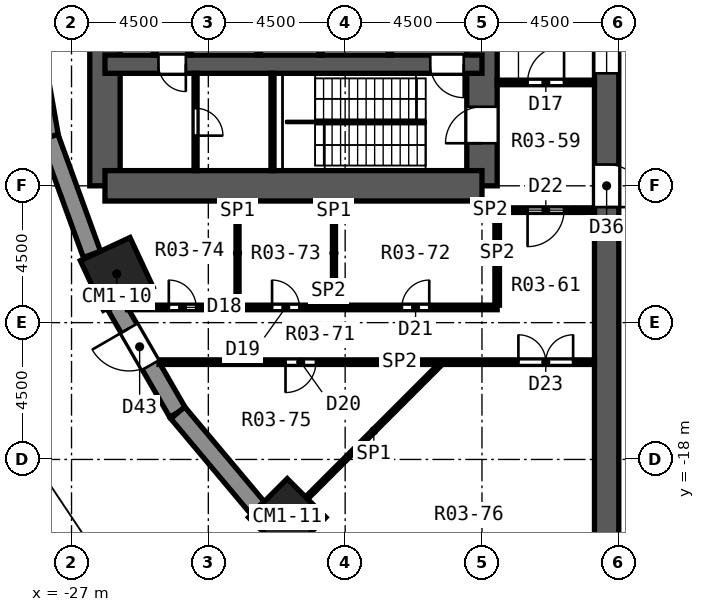
"""IFC4 building model, lengths in metres.
Left out: names, types, materials, properties, quantities, classifications, styles, units other than length and angle.
Written with IfcOpenShell. Run it as: python <this file> out.ifc"""

import sys

from ifc_helpers import new_model, si_unit, direction, frame, frame_2d, origin, origin_2d, place, context, subcontext, project, spatial, rectangle, extrude, element, fill, save


model = new_model("IFC4")
c1 = context("Model", 3, precision=1e-05, world=origin(), true_north=direction((0.0, 1.0)))
c2 = subcontext(c1, "Body", "Model", "MODEL_VIEW")
j1 = project(units=[si_unit("LENGTHUNIT", "METRE"), si_unit("PLANEANGLEUNIT", "RADIAN")], contexts=[c1])
p1 = place(None, origin())
s1 = spatial("IfcSite", under=j1, at=p1, CompositionType="ELEMENT")
p2 = place(p1, origin())
s2 = spatial("IfcBuilding", under=s1, at=p2, CompositionType="ELEMENT")
p3 = place(p2, origin())
s3 = spatial("IfcBuildingStorey", under=s2, at=p3, CompositionType="ELEMENT", Elevation=0.0)
for number, where, z_axis, x_axis in (
    (1, (-25.512, -11.897, 0.0), (0.0, 0.0, 1.0), (-0.906, -0.423, 0.0)),
    (2, (-19.905, -19.905, 0.0), (0.0, 0.0, 1.0), (-0.707, -0.707, 0.0)),
):
    element("IfcColumn", number, at=place(p3, frame(where, z_axis=z_axis, x_axis=x_axis)), inside=s3, PredefinedType="COLUMN", context=c2, shape_type="SweptSolid", body=[
        extrude(rectangle(XDim=1.8, YDim=1.8, at=origin_2d()), origin(), (0.0, 0.0, 1.0), 5.0),
    ])
p4 = place(p3, frame((-13.5, -9.0, 0.0), z_axis=(0.0, 0.0, 1.0), x_axis=(0.0, 1.0, 0.0)))
e3 = element("IfcWall", 3, at=p4, inside=s3, PredefinedType="SHEAR", context=c2, shape_type="SweptSolid", body=[
    extrude(rectangle(XDim=18.0, YDim=1.0, at=frame_2d((9.0, 0.0))), origin(), (0.0, 0.0, 1.0), 5.0),
])
p5 = place(p4, frame((15.4, 0.0, 0.0)))
e4 = element("IfcOpeningElement", 4, at=p5, cuts=e3, PredefinedType="OPENING", context=c2, shape_type="SweptSolid", body=[
    extrude(rectangle(XDim=1.2, YDim=2.1, at=frame_2d((0.6, 1.05))), frame((0.0, 0.512, 0.0), z_axis=(0.0, -1.0, 0.0), x_axis=(1.0, 0.0, 0.0)), (0.0, 0.0, 1.0), 1.024),
])
p6 = place(p4, frame((1.4, 0.0, 0.0)))
e5 = element("IfcOpeningElement", 5, at=p6, cuts=e3, PredefinedType="OPENING", context=c2, shape_type="SweptSolid", body=[
    extrude(rectangle(XDim=1.2, YDim=2.1, at=frame_2d((0.6, 1.05))), frame((0.0, 0.512, 0.0), z_axis=(0.0, -1.0, 0.0), x_axis=(1.0, 0.0, 0.0)), (0.0, 0.0, 1.0), 1.024),
])
p7 = place(p4, frame((7.5, 0.0, 0.0)))
e6 = element("IfcOpeningElement", 6, at=p7, cuts=e3, PredefinedType="OPENING", context=c2, shape_type="SweptSolid", body=[
    extrude(rectangle(XDim=3.0, YDim=2.4, at=frame_2d((1.5, 1.2))), frame((0.0, 0.512, 0.0), z_axis=(0.0, -1.0, 0.0), x_axis=(1.0, 0.0, 0.0)), (0.0, 0.0, 1.0), 1.024),
])
p8 = place(p3, frame((-25.9, -9.0, 0.0), z_axis=(0.0, 0.0, 1.0), x_axis=(0.0, 1.0, 0.0)))
e7 = element("IfcWall", 7, at=p8, inside=s3, PredefinedType="SHEAR", context=c2, shape_type="SweptSolid", body=[
    extrude(rectangle(XDim=18.0, YDim=1.0, at=frame_2d((9.0, 0.0))), origin(), (0.0, 0.0, 1.0), 5.0),
])
p9 = place(p3, frame((-13.5, -9.0, 0.0), z_axis=(0.0, 0.0, 1.0), x_axis=(-1.0, 0.0, 0.0)))
e8 = element("IfcWall", 8, at=p9, inside=s3, PredefinedType="SHEAR", context=c2, shape_type="SweptSolid", body=[
    extrude(rectangle(XDim=12.4, YDim=1.0, at=frame_2d((6.2, 0.0))), origin(), (0.0, 0.0, 1.0), 5.0),
])
p10 = place(p3, frame((-13.5, -5.0, 0.0), z_axis=(0.0, 0.0, 1.0), x_axis=(-1.0, 0.0, 0.0)))
e9 = element("IfcWall", 9, at=p10, inside=s3, PredefinedType="SHEAR", context=c2, shape_type="SweptSolid", body=[
    extrude(rectangle(XDim=12.4, YDim=0.6, at=frame_2d((6.2, 0.0))), origin(), (0.0, 0.0, 1.0), 5.0),
])
p11 = place(p10, frame((9.74, 0.0, 0.0)))
e10 = element("IfcOpeningElement", 10, at=p11, cuts=e9, PredefinedType="OPENING", context=c2, shape_type="SweptSolid", body=[
    extrude(rectangle(XDim=0.9, YDim=2.1, at=frame_2d((0.45, 1.05))), frame((0.0, 0.312, 0.0), z_axis=(0.0, -1.0, 0.0), x_axis=(1.0, 0.0, 0.0)), (0.0, 0.0, 1.0), 0.624),
])
p12 = place(p10, frame((0.6, 0.0, 0.0)))
e11 = element("IfcOpeningElement", 11, at=p12, cuts=e9, PredefinedType="OPENING", context=c2, shape_type="SweptSolid", body=[
    extrude(rectangle(XDim=1.1, YDim=2.1, at=frame_2d((0.55, 1.05))), frame((0.0, 0.312, 0.0), z_axis=(0.0, -1.0, 0.0), x_axis=(1.0, 0.0, 0.0)), (0.0, 0.0, 1.0), 0.624),
])
p13 = place(p3, frame((-9.4, -27.077, 0.0), z_axis=(0.0, 0.0, 1.0), x_axis=(0.0, 1.0, 0.0)))
e12 = element("IfcWall", 12, at=p13, inside=s3, PredefinedType="SHEAR", context=c2, shape_type="SweptSolid", body=[
    extrude(rectangle(XDim=54.154, YDim=0.8, at=frame_2d((27.077, 0.0))), origin(), (0.0, 0.0, 1.0), 5.0),
])
p14 = place(p13, frame((17.377, 0.0, 0.0)))
e13 = element("IfcOpeningElement", 13, at=p14, cuts=e12, PredefinedType="OPENING", context=c2, shape_type="SweptSolid", body=[
    extrude(rectangle(XDim=1.4, YDim=2.1, at=frame_2d((0.7, 1.05))), frame((0.0, 0.412, 0.0), z_axis=(0.0, -1.0, 0.0), x_axis=(1.0, 0.0, 0.0)), (0.0, 0.0, 1.0), 0.824),
])
p15 = place(p13, frame((21.777, 0.0, 0.3)))
e14 = element("IfcOpeningElement", 14, at=p15, cuts=e12, PredefinedType="OPENING", context=c2, shape_type="SweptSolid", body=[
    extrude(rectangle(XDim=2.4, YDim=2.1, at=frame_2d((1.2, 1.05))), frame((0.0, 0.412, 0.0), z_axis=(0.0, -1.0, 0.0), x_axis=(1.0, 0.0, 0.0)), (0.0, 0.0, 1.0), 0.824),
])
p16 = place(p13, frame((24.377, 0.0, 0.0)))
e15 = element("IfcOpeningElement", 15, at=p16, cuts=e12, PredefinedType="OPENING", context=c2, shape_type="SweptSolid", body=[
    extrude(rectangle(XDim=1.4, YDim=2.1, at=frame_2d((0.7, 1.05))), frame((0.0, 0.412, 0.0), z_axis=(0.0, -1.0, 0.0), x_axis=(1.0, 0.0, 0.0)), (0.0, 0.0, 1.0), 0.824),
])
p17 = place(p13, frame((28.477, 0.0, 0.3)))
e16 = element("IfcOpeningElement", 16, at=p17, cuts=e12, PredefinedType="OPENING", context=c2, shape_type="SweptSolid", body=[
    extrude(rectangle(XDim=2.4, YDim=2.1, at=frame_2d((1.2, 1.05))), frame((0.0, 0.412, 0.0), z_axis=(0.0, -1.0, 0.0), x_axis=(1.0, 0.0, 0.0)), (0.0, 0.0, 1.0), 0.824),
])
p18 = place(p13, frame((33.877, 0.0, 0.0)))
e17 = element("IfcOpeningElement", 17, at=p18, cuts=e12, PredefinedType="OPENING", context=c2, shape_type="SweptSolid", body=[
    extrude(rectangle(XDim=1.4, YDim=2.1, at=frame_2d((0.7, 1.05))), frame((0.0, 0.412, 0.0), z_axis=(0.0, -1.0, 0.0), x_axis=(1.0, 0.0, 0.0)), (0.0, 0.0, 1.0), 0.824),
])
p19 = place(p13, frame((37.877, 0.0, 0.3)))
e18 = element("IfcOpeningElement", 18, at=p19, cuts=e12, PredefinedType="OPENING", context=c2, shape_type="SweptSolid", body=[
    extrude(rectangle(XDim=2.4, YDim=2.1, at=frame_2d((1.2, 1.05))), frame((0.0, 0.412, 0.0), z_axis=(0.0, -1.0, 0.0), x_axis=(1.0, 0.0, 0.0)), (0.0, 0.0, 1.0), 0.824),
])
p20 = place(p3, frame((-28.428, -3.417, 0.0), z_axis=(0.0, 0.0, 1.0), x_axis=(0.173673210505, -0.984803338719, 0.0)))
e19 = element("IfcWall", 19, at=p20, inside=s3, PredefinedType="SOLIDWALL", context=c2, shape_type="SweptSolid", body=[
    extrude(rectangle(XDim=4.099, YDim=0.6, at=frame_2d((2.05, 0.0))), origin(), (0.0, 0.0, 1.0), 4.45),
])
p21 = place(p3, frame((-27.73, -7.403, 0.0), z_axis=(0.0, 0.0, 1.0), x_axis=(0.342034744565, -0.939687306241, 0.0)))
e20 = element("IfcWall", 20, at=p21, inside=s3, PredefinedType="SOLIDWALL", context=c2, shape_type="SweptSolid", body=[
    extrude(rectangle(XDim=4.099, YDim=0.6, at=frame_2d((2.05, 0.0))), origin(), (0.0, 0.0, 1.0), 4.45),
])
p22 = place(p3, frame((-25.545, -12.934, 0.0), z_axis=(0.0, 0.0, 1.0), x_axis=(0.500023678693, -0.866011732453, 0.0)))
e21 = element("IfcWall", 21, at=p22, inside=s3, PredefinedType="SOLIDWALL", context=c2, shape_type="SweptSolid", body=[
    extrude(rectangle(XDim=4.069, YDim=0.6, at=frame_2d((2.035, 0.0))), origin(), (0.0, 0.0, 1.0), 4.45),
])
p23 = place(p22, frame((0.872, 0.0, 0.0)))
e22 = element("IfcOpeningElement", 22, at=p23, cuts=e21, PredefinedType="OPENING", context=c2, shape_type="SweptSolid", body=[
    extrude(rectangle(XDim=1.4, YDim=2.1, at=frame_2d((0.7, 1.05))), frame((0.0, 0.312, 0.0), z_axis=(0.0, -1.0, 0.0), x_axis=(1.0, 0.0, 0.0)), (0.0, 0.0, 1.0), 0.624),
])
p24 = place(p3, frame((-23.506, -16.464, 0.0), z_axis=(0.0, 0.0, 1.0), x_axis=(0.642800844336, -0.766033337734, 0.0)))
e23 = element("IfcWall", 23, at=p24, inside=s3, PredefinedType="SOLIDWALL", context=c2, shape_type="SweptSolid", body=[
    extrude(rectangle(XDim=4.069, YDim=0.6, at=frame_2d((2.035, 0.0))), origin(), (0.0, 0.0, 1.0), 4.45),
])
p25 = place(p3, frame((-24.121, -14.8, 0.0), z_axis=(0.0, 0.0, 1.0), x_axis=(1.0, 0.0, 0.0)))
e24 = element("IfcWall", 24, at=p25, inside=s3, PredefinedType="PARTITIONING", context=c2, shape_type="SweptSolid", body=[
    extrude(rectangle(XDim=14.321, YDim=0.15, at=frame_2d((7.161, 0.0))), origin(), (0.0, 0.0, 1.0), 4.45),
])
p26 = place(p25, frame((4.159, 0.0, 0.0)))
e25 = element("IfcOpeningElement", 25, at=p26, cuts=e24, PredefinedType="OPENING", context=c2, shape_type="SweptSolid", body=[
    extrude(rectangle(XDim=1.0, YDim=2.1, at=frame_2d((0.5, 1.05))), frame((0.0, 0.087, 0.0), z_axis=(0.0, -1.0, 0.0), x_axis=(1.0, 0.0, 0.0)), (0.0, 0.0, 1.0), 0.174),
])
p27 = place(p25, frame((11.819, 0.0, 0.0)))
e26 = element("IfcOpeningElement", 26, at=p27, cuts=e24, PredefinedType="OPENING", context=c2, shape_type="SweptSolid", body=[
    extrude(rectangle(XDim=1.8, YDim=2.1, at=frame_2d((0.9, 1.05))), frame((0.0, 0.087, 0.0), z_axis=(0.0, -1.0, 0.0), x_axis=(1.0, 0.0, 0.0)), (0.0, 0.0, 1.0), 0.174),
])
p28 = place(p3, frame((-25.16, -13.0, 0.0), z_axis=(0.0, 0.0, 1.0), x_axis=(1.0, 0.0, 0.0)))
e27 = element("IfcWall", 27, at=p28, inside=s3, PredefinedType="PARTITIONING", context=c2, shape_type="SweptSolid", body=[
    extrude(rectangle(XDim=12.16, YDim=0.15, at=frame_2d((6.08, 0.0))), origin(), (0.0, 0.0, 1.0), 4.45),
])
p29 = place(p28, frame((1.36, 0.0, 0.0)))
e28 = element("IfcOpeningElement", 28, at=p29, cuts=e27, PredefinedType="OPENING", context=c2, shape_type="SweptSolid", body=[
    extrude(rectangle(XDim=0.9, YDim=2.1, at=frame_2d((0.45, 1.05))), frame((0.0, 0.087, 0.0), z_axis=(0.0, -1.0, 0.0), x_axis=(1.0, 0.0, 0.0)), (0.0, 0.0, 1.0), 0.174),
])
p30 = place(p28, frame((4.756, 0.0, 0.0)))
e29 = element("IfcOpeningElement", 29, at=p30, cuts=e27, PredefinedType="OPENING", context=c2, shape_type="SweptSolid", body=[
    extrude(rectangle(XDim=0.9, YDim=2.1, at=frame_2d((0.45, 1.05))), frame((0.0, 0.087, 0.0), z_axis=(0.0, -1.0, 0.0), x_axis=(1.0, 0.0, 0.0)), (0.0, 0.0, 1.0), 0.174),
])
p31 = place(p28, frame((9.026, 0.0, 0.0)))
e30 = element("IfcOpeningElement", 30, at=p31, cuts=e27, PredefinedType="OPENING", context=c2, shape_type="SweptSolid", body=[
    extrude(rectangle(XDim=0.9, YDim=2.1, at=frame_2d((0.45, 1.05))), frame((0.0, 0.087, 0.0), z_axis=(0.0, -1.0, 0.0), x_axis=(1.0, 0.0, 0.0)), (0.0, 0.0, 1.0), 0.174),
])
p32 = place(p3, frame((-12.925, -9.8, 0.0), z_axis=(0.0, 0.0, 1.0), x_axis=(1.0, 0.0, 0.0)))
e31 = element("IfcWall", 31, at=p32, inside=s3, PredefinedType="PARTITIONING", context=c2, shape_type="SweptSolid", body=[
    extrude(rectangle(XDim=3.125, YDim=0.15, at=frame_2d((1.562, 0.0))), origin(), (0.0, 0.0, 1.0), 4.45),
])
p33 = place(p32, frame((0.925, 0.0, 0.0)))
e32 = element("IfcOpeningElement", 32, at=p33, cuts=e31, PredefinedType="OPENING", context=c2, shape_type="SweptSolid", body=[
    extrude(rectangle(XDim=1.2, YDim=2.1, at=frame_2d((0.6, 1.05))), frame((0.0, 0.087, 0.0), z_axis=(0.0, -1.0, 0.0), x_axis=(1.0, 0.0, 0.0)), (0.0, 0.0, 1.0), 0.174),
])
p34 = place(p3, frame((-13.0, -5.6, 0.0), z_axis=(0.0, 0.0, 1.0), x_axis=(1.0, 0.0, 0.0)))
e33 = element("IfcWall", 33, at=p34, inside=s3, PredefinedType="PARTITIONING", context=c2, shape_type="SweptSolid", body=[
    extrude(rectangle(XDim=3.2, YDim=0.15, at=frame_2d((1.6, 0.0))), origin(), (0.0, 0.0, 1.0), 4.45),
])
p35 = place(p34, frame((1.0, 0.0, 0.0)))
e34 = element("IfcOpeningElement", 34, at=p35, cuts=e33, PredefinedType="OPENING", context=c2, shape_type="SweptSolid", body=[
    extrude(rectangle(XDim=1.2, YDim=2.1, at=frame_2d((0.6, 1.05))), frame((0.0, 0.087, 0.0), z_axis=(0.0, -1.0, 0.0), x_axis=(1.0, 0.0, 0.0)), (0.0, 0.0, 1.0), 0.174),
])
p36 = place(p3, frame((-19.262, -19.262, 0.0), z_axis=(0.0, 0.0, 1.0), x_axis=(0.707106781187, 0.707106781187, 0.0)))
e35 = element("IfcWall", 35, at=p36, inside=s3, PredefinedType="PARTITIONING", context=c2, shape_type="SweptSolid", body=[
    extrude(rectangle(XDim=6.235, YDim=0.1, at=frame_2d((3.117, 0.0))), origin(), (0.0, 0.0, 1.0), 4.45),
])
p37 = place(p3, frame((-13.0, -12.925, 0.0), z_axis=(0.0, 0.0, 1.0), x_axis=(0.0, 1.0, 0.0)))
e36 = element("IfcWall", 36, at=p37, inside=s3, PredefinedType="PARTITIONING", context=c2, shape_type="SweptSolid", body=[
    extrude(rectangle(XDim=3.425, YDim=0.15, at=frame_2d((1.712, 0.0))), origin(), (0.0, 0.0, 1.0), 4.45),
])
for number, where, z_axis, x_axis in (
    (37, (-18.368, -12.925, 0.0), (0.0, 0.0, 1.0), (0.0, 1.0, 0.0)),
    (38, (-21.54, -12.925, 0.0), (0.0, 0.0, 1.0), (0.0, 1.0, 0.0)),
):
    element("IfcWall", number, at=place(p3, frame(where, z_axis=z_axis, x_axis=x_axis)), inside=s3, PredefinedType="PARTITIONING", context=c2, shape_type="SweptSolid", body=[
        extrude(rectangle(XDim=3.425, YDim=0.1, at=frame_2d((1.712, 0.0))), origin(), (0.0, 0.0, 1.0), 4.45),
    ])
p38 = place(p3, frame((-16.53, -4.7, 0.0), z_axis=(0.0, 0.0, 1.0), x_axis=(0.0, 1.0, 0.0)))
e39 = element("IfcWall", 39, at=p38, inside=s3, PredefinedType="PARTITIONING", context=c2, shape_type="SweptSolid", body=[
    extrude(rectangle(XDim=2.4, YDim=0.12, at=frame_2d((1.2, 0.0))), origin(), (0.0, 0.0, 1.0), 4.45),
])
p39 = place(p38, frame((0.65, 0.0, 0.0)))
e40 = element("IfcOpeningElement", 40, at=p39, cuts=e39, PredefinedType="OPENING", context=c2, shape_type="SweptSolid", body=[
    extrude(rectangle(XDim=1.1, YDim=2.1, at=frame_2d((0.55, 1.05))), frame((0.0, 0.072, 0.0), z_axis=(0.0, -1.0, 0.0), x_axis=(1.0, 0.0, 0.0)), (0.0, 0.0, 1.0), 0.144),
])
for number, where, z_axis, x_axis in (
    (41, (-18.81, -4.7, 0.0), (0.0, 0.0, 1.0), (0.0, 1.0, 0.0)),
    (42, (-20.84, -4.7, 0.0), (0.0, 0.0, 1.0), (0.0, 1.0, 0.0)),
    (43, (-23.12, -4.7, 0.0), (0.0, 0.0, 1.0), (0.0, 1.0, 0.0)),
):
    element("IfcWall", number, at=place(p3, frame(where, z_axis=z_axis, x_axis=x_axis)), inside=s3, PredefinedType="PARTITIONING", context=c2, shape_type="SweptSolid", body=[
        extrude(rectangle(XDim=2.4, YDim=0.12, at=frame_2d((1.2, 0.0))), origin(), (0.0, 0.0, 1.0), 4.45),
    ])
p40 = place(p3, frame((-24.26, -4.7, 0.0), z_axis=(0.0, 0.0, 1.0), x_axis=(0.0, 1.0, 0.0)))
e44 = element("IfcWall", 44, at=p40, inside=s3, PredefinedType="PARTITIONING", context=c2, shape_type="SweptSolid", body=[
    extrude(rectangle(XDim=2.4, YDim=0.1, at=frame_2d((1.2, 0.0))), origin(), (0.0, 0.0, 1.0), 4.45),
])
p41 = place(p3, frame((-20.39, -8.5, 0.0), z_axis=(0.0, 0.0, 1.0), x_axis=(0.0, 1.0, 0.0)))
e45 = element("IfcWall", 45, at=p41, inside=s3, PredefinedType="PARTITIONING", context=c2, shape_type="SweptSolid", body=[
    extrude(rectangle(XDim=3.2, YDim=0.1, at=frame_2d((1.6, 0.0))), origin(), (0.0, 0.0, 1.0), 4.45),
])
p42 = place(p3, frame((-22.92, -8.5, 0.0), z_axis=(0.0, 0.0, 1.0), x_axis=(0.0, 1.0, 0.0)))
e46 = element("IfcWall", 46, at=p42, inside=s3, PredefinedType="PARTITIONING", context=c2, shape_type="SweptSolid", body=[
    extrude(rectangle(XDim=3.2, YDim=0.1, at=frame_2d((1.6, 0.0))), origin(), (0.0, 0.0, 1.0), 4.45),
])
p43 = place(p42, frame((1.15, 0.0, 0.0)))
e47 = element("IfcOpeningElement", 47, at=p43, cuts=e46, PredefinedType="OPENING", context=c2, shape_type="SweptSolid", body=[
    extrude(rectangle(XDim=0.9, YDim=2.1, at=frame_2d((0.45, 1.05))), frame((0.0, 0.062, 0.0), z_axis=(0.0, -1.0, 0.0), x_axis=(1.0, 0.0, 0.0)), (0.0, 0.0, 1.0), 0.124),
])
p44 = place(p35, origin())
e48 = element("IfcDoor", 48, at=p44, inside=s3, OperationType="SINGLE_SWING_RIGHT", PredefinedType="DOOR", context=c2, shape_type="SweptSolid", body=[
    extrude(rectangle(XDim=1.2, YDim=2.1, at=frame_2d((0.6, 1.05))), frame((0.0, 0.025, 0.0), z_axis=(0.0, -1.0, 0.0), x_axis=(1.0, 0.0, 0.0)), (0.0, 0.0, 1.0), 0.05),
])
fill(e34, e48)
p45 = place(p29, origin())
e49 = element("IfcDoor", 49, at=p45, inside=s3, OperationType="SINGLE_SWING_LEFT", PredefinedType="DOOR", context=c2, shape_type="SweptSolid", body=[
    extrude(rectangle(XDim=0.9, YDim=2.1, at=frame_2d((0.45, 1.05))), frame((0.0, 0.025, 0.0), z_axis=(0.0, -1.0, 0.0), x_axis=(1.0, 0.0, 0.0)), (0.0, 0.0, 1.0), 0.05),
])
fill(e28, e49)
p46 = place(p30, origin())
e50 = element("IfcDoor", 50, at=p46, inside=s3, OperationType="SINGLE_SWING_LEFT", PredefinedType="DOOR", context=c2, shape_type="SweptSolid", body=[
    extrude(rectangle(XDim=0.9, YDim=2.1, at=frame_2d((0.45, 1.05))), frame((0.0, 0.025, 0.0), z_axis=(0.0, -1.0, 0.0), x_axis=(1.0, 0.0, 0.0)), (0.0, 0.0, 1.0), 0.05),
])
fill(e29, e50)
p47 = place(p26, frame((1.0, 0.0, 0.0), z_axis=(0.0, 0.0, 1.0), x_axis=(-1.0, 0.0, 0.0)))
e51 = element("IfcDoor", 51, at=p47, inside=s3, OperationType="SINGLE_SWING_RIGHT", PredefinedType="DOOR", context=c2, shape_type="SweptSolid", body=[
    extrude(rectangle(XDim=1.0, YDim=2.1, at=frame_2d((0.5, 1.05))), frame((0.0, 0.025, 0.0), z_axis=(0.0, -1.0, 0.0), x_axis=(1.0, 0.0, 0.0)), (0.0, 0.0, 1.0), 0.05),
])
fill(e25, e51)
p48 = place(p31, origin())
e52 = element("IfcDoor", 52, at=p48, inside=s3, OperationType="SINGLE_SWING_RIGHT", PredefinedType="DOOR", context=c2, shape_type="SweptSolid", body=[
    extrude(rectangle(XDim=0.9, YDim=2.1, at=frame_2d((0.45, 1.05))), frame((0.0, 0.025, 0.0), z_axis=(0.0, -1.0, 0.0), x_axis=(1.0, 0.0, 0.0)), (0.0, 0.0, 1.0), 0.05),
])
fill(e30, e52)
p49 = place(p33, frame((1.2, 0.0, 0.0), z_axis=(0.0, 0.0, 1.0), x_axis=(-1.0, 0.0, 0.0)))
e53 = element("IfcDoor", 53, at=p49, inside=s3, OperationType="SINGLE_SWING_RIGHT", PredefinedType="DOOR", context=c2, shape_type="SweptSolid", body=[
    extrude(rectangle(XDim=1.2, YDim=2.1, at=frame_2d((0.6, 1.05))), frame((0.0, 0.025, 0.0), z_axis=(0.0, -1.0, 0.0), x_axis=(1.0, 0.0, 0.0)), (0.0, 0.0, 1.0), 0.05),
])
fill(e32, e53)
p50 = place(p27, origin())
e54 = element("IfcDoor", 54, at=p50, inside=s3, OperationType="DOUBLE_DOOR_SINGLE_SWING", PredefinedType="DOOR", context=c2, shape_type="SweptSolid", body=[
    extrude(rectangle(XDim=1.8, YDim=2.1, at=frame_2d((0.9, 1.05))), frame((0.0, 0.025, 0.0), z_axis=(0.0, -1.0, 0.0), x_axis=(1.0, 0.0, 0.0)), (0.0, 0.0, 1.0), 0.05),
])
fill(e26, e54)
p51 = place(p14, frame((1.4, 0.0, 0.0), z_axis=(0.0, 0.0, 1.0), x_axis=(-1.0, 0.0, 0.0)))
e55 = element("IfcDoor", 55, at=p51, inside=s3, OperationType="SINGLE_SWING_RIGHT", PredefinedType="DOOR", context=c2, shape_type="SweptSolid", body=[
    extrude(rectangle(XDim=1.4, YDim=2.1, at=frame_2d((0.7, 1.05))), frame((0.0, 0.025, 0.0), z_axis=(0.0, -1.0, 0.0), x_axis=(1.0, 0.0, 0.0)), (0.0, 0.0, 1.0), 0.05),
])
fill(e13, e55)
p52 = place(p15, origin())
e56 = element("IfcWindow", 56, at=p52, inside=s3, PartitioningType="SINGLE_PANEL", PredefinedType="WINDOW", context=c2, shape_type="SweptSolid", body=[
    extrude(rectangle(XDim=2.4, YDim=2.1, at=frame_2d((1.2, 1.05))), frame((0.0, 0.03, 0.0), z_axis=(0.0, -1.0, 0.0), x_axis=(1.0, 0.0, 0.0)), (0.0, 0.0, 1.0), 0.06),
])
fill(e14, e56)
p53 = place(p23, frame((1.4, 0.0, 0.0), z_axis=(0.0, 0.0, 1.0), x_axis=(-1.0, 0.0, 0.0)))
e57 = element("IfcDoor", 57, at=p53, inside=s3, OperationType="SINGLE_SWING_RIGHT", PredefinedType="DOOR", context=c2, shape_type="SweptSolid", body=[
    extrude(rectangle(XDim=1.4, YDim=2.1, at=frame_2d((0.7, 1.05))), frame((0.0, 0.025, 0.0), z_axis=(0.0, -1.0, 0.0), x_axis=(1.0, 0.0, 0.0)), (0.0, 0.0, 1.0), 0.05),
])
fill(e22, e57)
p54 = place(p43, frame((0.9, 0.0, 0.0), z_axis=(0.0, 0.0, 1.0), x_axis=(-1.0, 0.0, 0.0)))
e58 = element("IfcDoor", 58, at=p54, inside=s3, OperationType="SINGLE_SWING_RIGHT", PredefinedType="DOOR", context=c2, shape_type="SweptSolid", body=[
    extrude(rectangle(XDim=0.9, YDim=2.1, at=frame_2d((0.45, 1.05))), frame((0.0, 0.025, 0.0), z_axis=(0.0, -1.0, 0.0), x_axis=(1.0, 0.0, 0.0)), (0.0, 0.0, 1.0), 0.05),
])
fill(e47, e58)
p55 = place(p11, origin())
e59 = element("IfcDoor", 59, at=p55, inside=s3, OperationType="SINGLE_SWING_LEFT", PredefinedType="DOOR", context=c2, shape_type="SweptSolid", body=[
    extrude(rectangle(XDim=0.9, YDim=2.1, at=frame_2d((0.45, 1.05))), frame((0.0, 0.025, 0.0), z_axis=(0.0, -1.0, 0.0), x_axis=(1.0, 0.0, 0.0)), (0.0, 0.0, 1.0), 0.05),
])
fill(e10, e59)
p56 = place(p12, origin())
e60 = element("IfcDoor", 60, at=p56, inside=s3, OperationType="SINGLE_SWING_LEFT", PredefinedType="DOOR", context=c2, shape_type="SweptSolid", body=[
    extrude(rectangle(XDim=1.1, YDim=2.1, at=frame_2d((0.55, 1.05))), frame((0.0, 0.025, 0.0), z_axis=(0.0, -1.0, 0.0), x_axis=(1.0, 0.0, 0.0)), (0.0, 0.0, 1.0), 0.05),
])
fill(e11, e60)
p57 = place(p6, origin())
e61 = element("IfcDoor", 61, at=p57, inside=s3, OperationType="SINGLE_SWING_LEFT", PredefinedType="DOOR", context=c2, shape_type="SweptSolid", body=[
    extrude(rectangle(XDim=1.2, YDim=2.1, at=frame_2d((0.6, 1.05))), frame((0.0, 0.025, 0.0), z_axis=(0.0, -1.0, 0.0), x_axis=(1.0, 0.0, 0.0)), (0.0, 0.0, 1.0), 0.05),
])
fill(e5, e61)
save(model, sys.argv[1])
